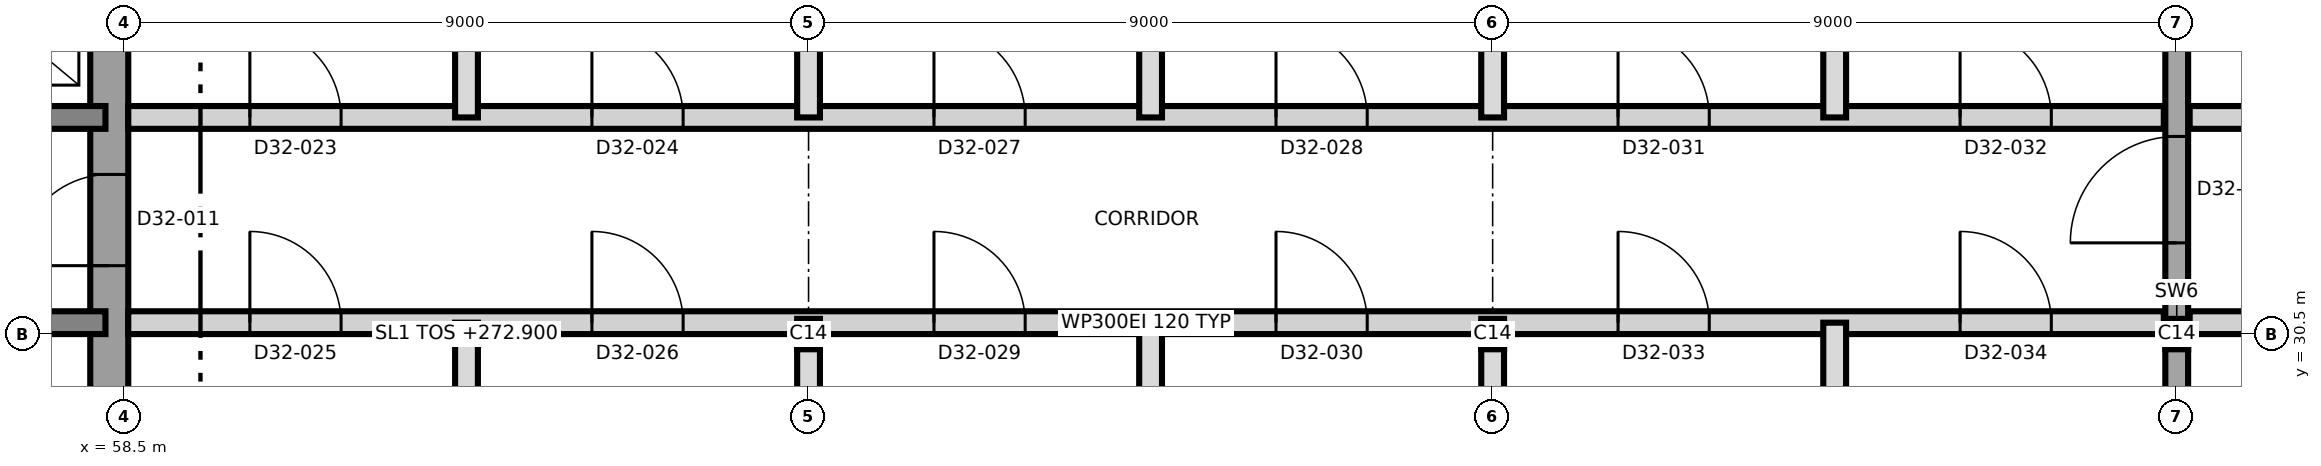
"""IFC4 building model, lengths in metres.
Left out: names, types, materials, properties, quantities, classifications, styles, units other than length and angle.
Written with IfcOpenShell. Run it as: python <this file> out.ifc"""

import sys

from ifc_helpers import new_model, si_unit, direction, frame, frame_2d, origin, origin_2d, place, context, subcontext, project, spatial, rectangle, i_section, extrude, element, fill, save


model = new_model("IFC4")
c1 = context("Model", 3, precision=1e-05, world=origin(), true_north=direction((0.0, 1.0)))
c2 = subcontext(c1, "Body", "Model", "MODEL_VIEW")
j1 = project(units=[si_unit("LENGTHUNIT", "METRE"), si_unit("PLANEANGLEUNIT", "RADIAN")], contexts=[c1])
p1 = place(None, origin())
s1 = spatial("IfcSite", under=j1, at=p1, CompositionType="ELEMENT")
p2 = place(p1, origin())
s2 = spatial("IfcBuilding", under=s1, at=p2, CompositionType="ELEMENT")
p3 = place(p2, frame((0.0, 0.0, 272.9)))
s3 = spatial("IfcBuildingStorey", under=s2, at=p3, CompositionType="ELEMENT", Elevation=272.9)
p4 = place(p3, frame((58.3, 21.25, 0.0), z_axis=(0.0, 0.0, 1.0), x_axis=(0.0, 1.0, 0.0)))
e1 = element("IfcWall", 1, at=p4, inside=s3, PredefinedType="SHEAR", context=c2, shape_type="SweptSolid", body=[
    extrude(rectangle(XDim=18.5, YDim=0.5, at=frame_2d((9.25, 0.0))), origin(), (0.0, 0.0, 1.0), 4.2),
])
p5 = place(p4, frame((10.15, 0.0, 0.0)))
e2 = element("IfcOpeningElement", 2, at=p5, cuts=e1, PredefinedType="OPENING", context=c2, shape_type="SweptSolid", body=[
    extrude(rectangle(XDim=1.2, YDim=2.1, at=frame_2d((0.6, 1.05))), frame((0.0, 0.26, 0.0), z_axis=(0.0, -1.0, 0.0), x_axis=(1.0, 0.0, 0.0)), (0.0, 0.0, 1.0), 0.52),
])
p6 = place(p3, frame((31.75, 30.65, 0.0), z_axis=(0.0, 0.0, 1.0), x_axis=(1.0, 0.0, 0.0)))
e3 = element("IfcWall", 3, at=p6, inside=s3, PredefinedType="SHEAR", context=c2, shape_type="SweptSolid", body=[
    extrude(rectangle(XDim=26.5, YDim=0.3, at=frame_2d((13.25, 0.0))), origin(), (0.0, 0.0, 1.0), 4.2),
])
p7 = place(p6, frame((24.75, 0.0, 0.0)))
e4 = element("IfcOpeningElement", 4, at=p7, cuts=e3, PredefinedType="OPENING", context=c2, shape_type="SweptSolid", body=[
    extrude(rectangle(XDim=1.0, YDim=2.1, at=frame_2d((0.5, 1.05))), frame((0.0, 0.16, 0.0), z_axis=(0.0, -1.0, 0.0), x_axis=(1.0, 0.0, 0.0)), (0.0, 0.0, 1.0), 0.32),
])
p8 = place(p6, frame((11.55, 0.0, 0.0)))
e5 = element("IfcOpeningElement", 5, at=p8, cuts=e3, PredefinedType="OPENING", context=c2, shape_type="SweptSolid", body=[
    extrude(rectangle(XDim=1.0, YDim=2.1, at=frame_2d((0.5, 1.05))), frame((0.0, 0.16, 0.0), z_axis=(0.0, -1.0, 0.0), x_axis=(1.0, 0.0, 0.0)), (0.0, 0.0, 1.0), 0.32),
])
p9 = place(p3, frame((31.75, 33.35, 0.0), z_axis=(0.0, 0.0, 1.0), x_axis=(1.0, 0.0, 0.0)))
e6 = element("IfcWall", 6, at=p9, inside=s3, PredefinedType="SHEAR", context=c2, shape_type="SweptSolid", body=[
    extrude(rectangle(XDim=26.5, YDim=0.3, at=frame_2d((13.25, 0.0))), origin(), (0.0, 0.0, 1.0), 4.2),
])
p10 = place(p9, frame((13.9, 0.0, 0.0)))
e7 = element("IfcOpeningElement", 7, at=p10, cuts=e6, PredefinedType="OPENING", context=c2, shape_type="SweptSolid", body=[
    extrude(rectangle(XDim=1.4, YDim=2.1, at=frame_2d((0.7, 1.05))), frame((0.0, 0.16, 0.0), z_axis=(0.0, -1.0, 0.0), x_axis=(1.0, 0.0, 0.0)), (0.0, 0.0, 1.0), 0.32),
])
p11 = place(p9, frame((5.375, 0.0, 0.0)))
e8 = element("IfcOpeningElement", 8, at=p11, cuts=e6, PredefinedType="OPENING", context=c2, shape_type="SweptSolid", body=[
    extrude(rectangle(XDim=1.2, YDim=2.1, at=frame_2d((0.6, 1.05))), frame((0.0, 0.16, 0.0), z_axis=(0.0, -1.0, 0.0), x_axis=(1.0, 0.0, 0.0)), (0.0, 0.0, 1.0), 0.32),
])
p12 = place(p9, frame((19.925, 0.0, 0.0)))
e9 = element("IfcOpeningElement", 9, at=p12, cuts=e6, PredefinedType="OPENING", context=c2, shape_type="SweptSolid", body=[
    extrude(rectangle(XDim=1.2, YDim=2.1, at=frame_2d((0.6, 1.05))), frame((0.0, 0.16, 0.0), z_axis=(0.0, -1.0, 0.0), x_axis=(1.0, 0.0, 0.0)), (0.0, 0.0, 1.0), 0.32),
])
p13 = place(p9, frame((9.8, 0.0, 0.0)))
e10 = element("IfcOpeningElement", 10, at=p13, cuts=e6, PredefinedType="OPENING", context=c2, shape_type="SweptSolid", body=[
    extrude(rectangle(XDim=0.9, YDim=2.1, at=frame_2d((0.45, 1.05))), frame((0.0, 0.16, 0.0), z_axis=(0.0, -1.0, 0.0), x_axis=(1.0, 0.0, 0.0)), (0.0, 0.0, 1.0), 0.32),
])
p14 = place(p3, frame((85.5, 20.35, 0.0), z_axis=(0.0, 0.0, 1.0), x_axis=(0.0, 1.0, 0.0)))
e11 = element("IfcWall", 11, at=p14, inside=s3, PredefinedType="SHEAR", context=c2, shape_type="SweptSolid", body=[
    extrude(rectangle(XDim=20.3, YDim=0.3, at=frame_2d((10.15, 0.0))), origin(), (0.0, 0.0, 1.0), 4.2),
])
p15 = place(p14, frame((11.35, 0.0, 0.0)))
e12 = element("IfcOpeningElement", 12, at=p15, cuts=e11, PredefinedType="OPENING", context=c2, shape_type="SweptSolid", body=[
    extrude(rectangle(XDim=1.4, YDim=2.1, at=frame_2d((0.7, 1.05))), frame((0.0, 0.16, 0.0), z_axis=(0.0, -1.0, 0.0), x_axis=(1.0, 0.0, 0.0)), (0.0, 0.0, 1.0), 0.32),
])
for number, where, z_axis, x_axis in (
    (13, (67.5, 30.5, 0.0), (0.0, 0.0, 1.0), (1.0, 0.0, 0.0)),
    (14, (76.5, 30.5, 0.0), (0.0, 0.0, 1.0), (1.0, 0.0, 0.0)),
    (15, (85.5, 30.5, 0.0), (0.0, 0.0, 1.0), (1.0, 0.0, 0.0)),
):
    element("IfcColumn", number, at=place(p3, frame(where, z_axis=z_axis, x_axis=x_axis)), inside=s3, PredefinedType="COLUMN", context=c2, shape_type="SweptSolid", body=[
        extrude(i_section(OverallWidth=0.3, OverallDepth=0.4, WebThickness=0.013, FlangeThickness=0.024, FilletRadius=0.027, at=origin_2d()), origin(), (0.0, 0.0, 1.0), 4.2),
    ])
p16 = place(p3, frame((58.55, 30.65, 0.0), z_axis=(0.0, 0.0, 1.0), x_axis=(1.0, 0.0, 0.0)))
e16 = element("IfcWall", 16, at=p16, inside=s3, PredefinedType="PARTITIONING", context=c2, shape_type="SweptSolid", body=[
    extrude(rectangle(XDim=26.78, YDim=0.3, at=frame_2d((13.39, 0.0))), origin(), (0.0, 0.0, 1.0), 3.9),
])
p17 = place(p16, frame((1.6, 0.0, 0.0)))
e17 = element("IfcOpeningElement", 17, at=p17, cuts=e16, PredefinedType="OPENING", context=c2, shape_type="SweptSolid", body=[
    extrude(rectangle(XDim=1.2, YDim=2.1, at=frame_2d((0.6, 1.05))), frame((0.0, 0.16, 0.0), z_axis=(0.0, -1.0, 0.0), x_axis=(1.0, 0.0, 0.0)), (0.0, 0.0, 1.0), 0.32),
])
p18 = place(p16, frame((6.1, 0.0, 0.0)))
e18 = element("IfcOpeningElement", 18, at=p18, cuts=e16, PredefinedType="OPENING", context=c2, shape_type="SweptSolid", body=[
    extrude(rectangle(XDim=1.2, YDim=2.1, at=frame_2d((0.6, 1.05))), frame((0.0, 0.16, 0.0), z_axis=(0.0, -1.0, 0.0), x_axis=(1.0, 0.0, 0.0)), (0.0, 0.0, 1.0), 0.32),
])
p19 = place(p16, frame((10.6, 0.0, 0.0)))
e19 = element("IfcOpeningElement", 19, at=p19, cuts=e16, PredefinedType="OPENING", context=c2, shape_type="SweptSolid", body=[
    extrude(rectangle(XDim=1.2, YDim=2.1, at=frame_2d((0.6, 1.05))), frame((0.0, 0.16, 0.0), z_axis=(0.0, -1.0, 0.0), x_axis=(1.0, 0.0, 0.0)), (0.0, 0.0, 1.0), 0.32),
])
p20 = place(p16, frame((15.1, 0.0, 0.0)))
e20 = element("IfcOpeningElement", 20, at=p20, cuts=e16, PredefinedType="OPENING", context=c2, shape_type="SweptSolid", body=[
    extrude(rectangle(XDim=1.2, YDim=2.1, at=frame_2d((0.6, 1.05))), frame((0.0, 0.16, 0.0), z_axis=(0.0, -1.0, 0.0), x_axis=(1.0, 0.0, 0.0)), (0.0, 0.0, 1.0), 0.32),
])
p21 = place(p16, frame((19.6, 0.0, 0.0)))
e21 = element("IfcOpeningElement", 21, at=p21, cuts=e16, PredefinedType="OPENING", context=c2, shape_type="SweptSolid", body=[
    extrude(rectangle(XDim=1.2, YDim=2.1, at=frame_2d((0.6, 1.05))), frame((0.0, 0.16, 0.0), z_axis=(0.0, -1.0, 0.0), x_axis=(1.0, 0.0, 0.0)), (0.0, 0.0, 1.0), 0.32),
])
p22 = place(p16, frame((24.1, 0.0, 0.0)))
e22 = element("IfcOpeningElement", 22, at=p22, cuts=e16, PredefinedType="OPENING", context=c2, shape_type="SweptSolid", body=[
    extrude(rectangle(XDim=1.2, YDim=2.1, at=frame_2d((0.6, 1.05))), frame((0.0, 0.16, 0.0), z_axis=(0.0, -1.0, 0.0), x_axis=(1.0, 0.0, 0.0)), (0.0, 0.0, 1.0), 0.32),
])
p23 = place(p3, frame((85.67, 30.65, 0.0), z_axis=(0.0, 0.0, 1.0), x_axis=(1.0, 0.0, 0.0)))
e23 = element("IfcWall", 23, at=p23, inside=s3, PredefinedType="PARTITIONING", context=c2, shape_type="SweptSolid", body=[
    extrude(rectangle(XDim=9.58, YDim=0.3, at=frame_2d((4.79, 0.0))), origin(), (0.0, 0.0, 1.0), 3.9),
])
p24 = place(p23, frame((2.23, 0.0, 0.0)))
e24 = element("IfcOpeningElement", 24, at=p24, cuts=e23, PredefinedType="OPENING", context=c2, shape_type="SweptSolid", body=[
    extrude(rectangle(XDim=0.9, YDim=2.1, at=frame_2d((0.45, 1.05))), frame((0.0, 0.16, 0.0), z_axis=(0.0, -1.0, 0.0), x_axis=(1.0, 0.0, 0.0)), (0.0, 0.0, 1.0), 0.32),
])
p25 = place(p23, frame((5.63, 0.0, 0.0)))
e25 = element("IfcOpeningElement", 25, at=p25, cuts=e23, PredefinedType="OPENING", context=c2, shape_type="SweptSolid", body=[
    extrude(rectangle(XDim=1.0, YDim=2.1, at=frame_2d((0.5, 1.05))), frame((0.0, 0.16, 0.0), z_axis=(0.0, -1.0, 0.0), x_axis=(1.0, 0.0, 0.0)), (0.0, 0.0, 1.0), 0.32),
])
p26 = place(p3, frame((58.55, 33.35, 0.0), z_axis=(0.0, 0.0, 1.0), x_axis=(1.0, 0.0, 0.0)))
e26 = element("IfcWall", 26, at=p26, inside=s3, PredefinedType="PARTITIONING", context=c2, shape_type="SweptSolid", body=[
    extrude(rectangle(XDim=26.78, YDim=0.3, at=frame_2d((13.39, 0.0))), origin(), (0.0, 0.0, 1.0), 3.9),
])
p27 = place(p26, frame((1.6, 0.0, 0.0)))
e27 = element("IfcOpeningElement", 27, at=p27, cuts=e26, PredefinedType="OPENING", context=c2, shape_type="SweptSolid", body=[
    extrude(rectangle(XDim=1.2, YDim=2.1, at=frame_2d((0.6, 1.05))), frame((0.0, 0.16, 0.0), z_axis=(0.0, -1.0, 0.0), x_axis=(1.0, 0.0, 0.0)), (0.0, 0.0, 1.0), 0.32),
])
p28 = place(p26, frame((6.1, 0.0, 0.0)))
e28 = element("IfcOpeningElement", 28, at=p28, cuts=e26, PredefinedType="OPENING", context=c2, shape_type="SweptSolid", body=[
    extrude(rectangle(XDim=1.2, YDim=2.1, at=frame_2d((0.6, 1.05))), frame((0.0, 0.16, 0.0), z_axis=(0.0, -1.0, 0.0), x_axis=(1.0, 0.0, 0.0)), (0.0, 0.0, 1.0), 0.32),
])
p29 = place(p26, frame((10.6, 0.0, 0.0)))
e29 = element("IfcOpeningElement", 29, at=p29, cuts=e26, PredefinedType="OPENING", context=c2, shape_type="SweptSolid", body=[
    extrude(rectangle(XDim=1.2, YDim=2.1, at=frame_2d((0.6, 1.05))), frame((0.0, 0.16, 0.0), z_axis=(0.0, -1.0, 0.0), x_axis=(1.0, 0.0, 0.0)), (0.0, 0.0, 1.0), 0.32),
])
p30 = place(p26, frame((15.1, 0.0, 0.0)))
e30 = element("IfcOpeningElement", 30, at=p30, cuts=e26, PredefinedType="OPENING", context=c2, shape_type="SweptSolid", body=[
    extrude(rectangle(XDim=1.2, YDim=2.1, at=frame_2d((0.6, 1.05))), frame((0.0, 0.16, 0.0), z_axis=(0.0, -1.0, 0.0), x_axis=(1.0, 0.0, 0.0)), (0.0, 0.0, 1.0), 0.32),
])
p31 = place(p26, frame((19.6, 0.0, 0.0)))
e31 = element("IfcOpeningElement", 31, at=p31, cuts=e26, PredefinedType="OPENING", context=c2, shape_type="SweptSolid", body=[
    extrude(rectangle(XDim=1.2, YDim=2.1, at=frame_2d((0.6, 1.05))), frame((0.0, 0.16, 0.0), z_axis=(0.0, -1.0, 0.0), x_axis=(1.0, 0.0, 0.0)), (0.0, 0.0, 1.0), 0.32),
])
p32 = place(p26, frame((24.1, 0.0, 0.0)))
e32 = element("IfcOpeningElement", 32, at=p32, cuts=e26, PredefinedType="OPENING", context=c2, shape_type="SweptSolid", body=[
    extrude(rectangle(XDim=1.2, YDim=2.1, at=frame_2d((0.6, 1.05))), frame((0.0, 0.16, 0.0), z_axis=(0.0, -1.0, 0.0), x_axis=(1.0, 0.0, 0.0)), (0.0, 0.0, 1.0), 0.32),
])
p33 = place(p3, frame((85.67, 33.35, 0.0), z_axis=(0.0, 0.0, 1.0), x_axis=(1.0, 0.0, 0.0)))
e33 = element("IfcWall", 33, at=p33, inside=s3, PredefinedType="PARTITIONING", context=c2, shape_type="SweptSolid", body=[
    extrude(rectangle(XDim=9.58, YDim=0.3, at=frame_2d((4.79, 0.0))), origin(), (0.0, 0.0, 1.0), 3.9),
])
p34 = place(p33, frame((1.83, 0.0, 0.0)))
e34 = element("IfcOpeningElement", 34, at=p34, cuts=e33, PredefinedType="OPENING", context=c2, shape_type="SweptSolid", body=[
    extrude(rectangle(XDim=1.0, YDim=2.1, at=frame_2d((0.5, 1.05))), frame((0.0, 0.16, 0.0), z_axis=(0.0, -1.0, 0.0), x_axis=(1.0, 0.0, 0.0)), (0.0, 0.0, 1.0), 0.32),
])
p35 = place(p33, frame((5.63, 0.0, 0.0)))
e35 = element("IfcOpeningElement", 35, at=p35, cuts=e33, PredefinedType="OPENING", context=c2, shape_type="SweptSolid", body=[
    extrude(rectangle(XDim=1.0, YDim=2.1, at=frame_2d((0.5, 1.05))), frame((0.0, 0.16, 0.0), z_axis=(0.0, -1.0, 0.0), x_axis=(1.0, 0.0, 0.0)), (0.0, 0.0, 1.0), 0.32),
])
p36 = place(p3, frame((63.0, 20.17, 0.0), z_axis=(0.0, 0.0, 1.0), x_axis=(0.0, 1.0, 0.0)))
e36 = element("IfcWall", 36, at=p36, inside=s3, PredefinedType="PARTITIONING", context=c2, shape_type="SweptSolid", body=[
    extrude(rectangle(XDim=10.48, YDim=0.3, at=frame_2d((5.24, 0.0))), origin(), (0.0, 0.0, 1.0), 3.9),
])
p37 = place(p3, frame((63.0, 33.35, 0.0), z_axis=(0.0, 0.0, 1.0), x_axis=(0.0, 1.0, 0.0)))
e37 = element("IfcWall", 37, at=p37, inside=s3, PredefinedType="PARTITIONING", context=c2, shape_type="SweptSolid", body=[
    extrude(rectangle(XDim=7.48, YDim=0.3, at=frame_2d((3.74, 0.0))), origin(), (0.0, 0.0, 1.0), 3.9),
])
p38 = place(p3, frame((67.5, 20.17, 0.0), z_axis=(0.0, 0.0, 1.0), x_axis=(0.0, 1.0, 0.0)))
e38 = element("IfcWall", 38, at=p38, inside=s3, PredefinedType="PARTITIONING", context=c2, shape_type="SweptSolid", body=[
    extrude(rectangle(XDim=10.48, YDim=0.3, at=frame_2d((5.24, 0.0))), origin(), (0.0, 0.0, 1.0), 3.9),
])
p39 = place(p3, frame((67.5, 33.35, 0.0), z_axis=(0.0, 0.0, 1.0), x_axis=(0.0, 1.0, 0.0)))
e39 = element("IfcWall", 39, at=p39, inside=s3, PredefinedType="PARTITIONING", context=c2, shape_type="SweptSolid", body=[
    extrude(rectangle(XDim=7.48, YDim=0.3, at=frame_2d((3.74, 0.0))), origin(), (0.0, 0.0, 1.0), 3.9),
])
p40 = place(p3, frame((72.0, 20.17, 0.0), z_axis=(0.0, 0.0, 1.0), x_axis=(0.0, 1.0, 0.0)))
e40 = element("IfcWall", 40, at=p40, inside=s3, PredefinedType="PARTITIONING", context=c2, shape_type="SweptSolid", body=[
    extrude(rectangle(XDim=10.48, YDim=0.3, at=frame_2d((5.24, 0.0))), origin(), (0.0, 0.0, 1.0), 3.9),
])
p41 = place(p3, frame((72.0, 33.35, 0.0), z_axis=(0.0, 0.0, 1.0), x_axis=(0.0, 1.0, 0.0)))
e41 = element("IfcWall", 41, at=p41, inside=s3, PredefinedType="PARTITIONING", context=c2, shape_type="SweptSolid", body=[
    extrude(rectangle(XDim=7.48, YDim=0.3, at=frame_2d((3.74, 0.0))), origin(), (0.0, 0.0, 1.0), 3.9),
])
p42 = place(p3, frame((76.5, 20.17, 0.0), z_axis=(0.0, 0.0, 1.0), x_axis=(0.0, 1.0, 0.0)))
e42 = element("IfcWall", 42, at=p42, inside=s3, PredefinedType="PARTITIONING", context=c2, shape_type="SweptSolid", body=[
    extrude(rectangle(XDim=10.48, YDim=0.3, at=frame_2d((5.24, 0.0))), origin(), (0.0, 0.0, 1.0), 3.9),
])
p43 = place(p3, frame((76.5, 33.35, 0.0), z_axis=(0.0, 0.0, 1.0), x_axis=(0.0, 1.0, 0.0)))
e43 = element("IfcWall", 43, at=p43, inside=s3, PredefinedType="PARTITIONING", context=c2, shape_type="SweptSolid", body=[
    extrude(rectangle(XDim=7.48, YDim=0.3, at=frame_2d((3.74, 0.0))), origin(), (0.0, 0.0, 1.0), 3.9),
])
p44 = place(p3, frame((81.0, 20.17, 0.0), z_axis=(0.0, 0.0, 1.0), x_axis=(0.0, 1.0, 0.0)))
e44 = element("IfcWall", 44, at=p44, inside=s3, PredefinedType="PARTITIONING", context=c2, shape_type="SweptSolid", body=[
    extrude(rectangle(XDim=10.48, YDim=0.3, at=frame_2d((5.24, 0.0))), origin(), (0.0, 0.0, 1.0), 3.9),
])
p45 = place(p3, frame((81.0, 33.35, 0.0), z_axis=(0.0, 0.0, 1.0), x_axis=(0.0, 1.0, 0.0)))
e45 = element("IfcWall", 45, at=p45, inside=s3, PredefinedType="PARTITIONING", context=c2, shape_type="SweptSolid", body=[
    extrude(rectangle(XDim=7.48, YDim=0.3, at=frame_2d((3.74, 0.0))), origin(), (0.0, 0.0, 1.0), 3.9),
])
p46 = place(p5, origin())
e46 = element("IfcDoor", 46, at=p46, inside=s3, OperationType="SINGLE_SWING_LEFT", PredefinedType="DOOR", context=c2, shape_type="SweptSolid", body=[
    extrude(rectangle(XDim=1.2, YDim=2.1, at=frame_2d((0.6, 1.05))), frame((0.0, 0.025, 0.0), z_axis=(0.0, -1.0, 0.0), x_axis=(1.0, 0.0, 0.0)), (0.0, 0.0, 1.0), 0.05),
])
fill(e2, e46)
p47 = place(p27, origin())
e47 = element("IfcDoor", 47, at=p47, inside=s3, OperationType="SINGLE_SWING_LEFT", PredefinedType="DOOR", context=c2, shape_type="SweptSolid", body=[
    extrude(rectangle(XDim=1.2, YDim=2.1, at=frame_2d((0.6, 1.05))), frame((0.0, 0.025, 0.0), z_axis=(0.0, -1.0, 0.0), x_axis=(1.0, 0.0, 0.0)), (0.0, 0.0, 1.0), 0.05),
])
fill(e27, e47)
p48 = place(p28, origin())
e48 = element("IfcDoor", 48, at=p48, inside=s3, OperationType="SINGLE_SWING_LEFT", PredefinedType="DOOR", context=c2, shape_type="SweptSolid", body=[
    extrude(rectangle(XDim=1.2, YDim=2.1, at=frame_2d((0.6, 1.05))), frame((0.0, 0.025, 0.0), z_axis=(0.0, -1.0, 0.0), x_axis=(1.0, 0.0, 0.0)), (0.0, 0.0, 1.0), 0.05),
])
fill(e28, e48)
p49 = place(p17, origin())
e49 = element("IfcDoor", 49, at=p49, inside=s3, OperationType="SINGLE_SWING_RIGHT", PredefinedType="DOOR", context=c2, shape_type="SweptSolid", body=[
    extrude(rectangle(XDim=1.2, YDim=2.1, at=frame_2d((0.6, 1.05))), frame((0.0, 0.025, 0.0), z_axis=(0.0, -1.0, 0.0), x_axis=(1.0, 0.0, 0.0)), (0.0, 0.0, 1.0), 0.05),
])
fill(e17, e49)
p50 = place(p18, origin())
e50 = element("IfcDoor", 50, at=p50, inside=s3, OperationType="SINGLE_SWING_LEFT", PredefinedType="DOOR", context=c2, shape_type="SweptSolid", body=[
    extrude(rectangle(XDim=1.2, YDim=2.1, at=frame_2d((0.6, 1.05))), frame((0.0, 0.025, 0.0), z_axis=(0.0, -1.0, 0.0), x_axis=(1.0, 0.0, 0.0)), (0.0, 0.0, 1.0), 0.05),
])
fill(e18, e50)
p51 = place(p29, origin())
e51 = element("IfcDoor", 51, at=p51, inside=s3, OperationType="SINGLE_SWING_LEFT", PredefinedType="DOOR", context=c2, shape_type="SweptSolid", body=[
    extrude(rectangle(XDim=1.2, YDim=2.1, at=frame_2d((0.6, 1.05))), frame((0.0, 0.025, 0.0), z_axis=(0.0, -1.0, 0.0), x_axis=(1.0, 0.0, 0.0)), (0.0, 0.0, 1.0), 0.05),
])
fill(e29, e51)
p52 = place(p30, origin())
e52 = element("IfcDoor", 52, at=p52, inside=s3, OperationType="SINGLE_SWING_RIGHT", PredefinedType="DOOR", context=c2, shape_type="SweptSolid", body=[
    extrude(rectangle(XDim=1.2, YDim=2.1, at=frame_2d((0.6, 1.05))), frame((0.0, 0.025, 0.0), z_axis=(0.0, -1.0, 0.0), x_axis=(1.0, 0.0, 0.0)), (0.0, 0.0, 1.0), 0.05),
])
fill(e30, e52)
p53 = place(p19, origin())
e53 = element("IfcDoor", 53, at=p53, inside=s3, OperationType="SINGLE_SWING_LEFT", PredefinedType="DOOR", context=c2, shape_type="SweptSolid", body=[
    extrude(rectangle(XDim=1.2, YDim=2.1, at=frame_2d((0.6, 1.05))), frame((0.0, 0.025, 0.0), z_axis=(0.0, -1.0, 0.0), x_axis=(1.0, 0.0, 0.0)), (0.0, 0.0, 1.0), 0.05),
])
fill(e19, e53)
p54 = place(p20, origin())
e54 = element("IfcDoor", 54, at=p54, inside=s3, OperationType="SINGLE_SWING_LEFT", PredefinedType="DOOR", context=c2, shape_type="SweptSolid", body=[
    extrude(rectangle(XDim=1.2, YDim=2.1, at=frame_2d((0.6, 1.05))), frame((0.0, 0.025, 0.0), z_axis=(0.0, -1.0, 0.0), x_axis=(1.0, 0.0, 0.0)), (0.0, 0.0, 1.0), 0.05),
])
fill(e20, e54)
p55 = place(p31, origin())
e55 = element("IfcDoor", 55, at=p55, inside=s3, OperationType="SINGLE_SWING_RIGHT", PredefinedType="DOOR", context=c2, shape_type="SweptSolid", body=[
    extrude(rectangle(XDim=1.2, YDim=2.1, at=frame_2d((0.6, 1.05))), frame((0.0, 0.025, 0.0), z_axis=(0.0, -1.0, 0.0), x_axis=(1.0, 0.0, 0.0)), (0.0, 0.0, 1.0), 0.05),
])
fill(e31, e55)
p56 = place(p32, origin())
e56 = element("IfcDoor", 56, at=p56, inside=s3, OperationType="SINGLE_SWING_LEFT", PredefinedType="DOOR", context=c2, shape_type="SweptSolid", body=[
    extrude(rectangle(XDim=1.2, YDim=2.1, at=frame_2d((0.6, 1.05))), frame((0.0, 0.025, 0.0), z_axis=(0.0, -1.0, 0.0), x_axis=(1.0, 0.0, 0.0)), (0.0, 0.0, 1.0), 0.05),
])
fill(e32, e56)
p57 = place(p21, origin())
e57 = element("IfcDoor", 57, at=p57, inside=s3, OperationType="SINGLE_SWING_LEFT", PredefinedType="DOOR", context=c2, shape_type="SweptSolid", body=[
    extrude(rectangle(XDim=1.2, YDim=2.1, at=frame_2d((0.6, 1.05))), frame((0.0, 0.025, 0.0), z_axis=(0.0, -1.0, 0.0), x_axis=(1.0, 0.0, 0.0)), (0.0, 0.0, 1.0), 0.05),
])
fill(e21, e57)
p58 = place(p22, origin())
e58 = element("IfcDoor", 58, at=p58, inside=s3, OperationType="SINGLE_SWING_RIGHT", PredefinedType="DOOR", context=c2, shape_type="SweptSolid", body=[
    extrude(rectangle(XDim=1.2, YDim=2.1, at=frame_2d((0.6, 1.05))), frame((0.0, 0.025, 0.0), z_axis=(0.0, -1.0, 0.0), x_axis=(1.0, 0.0, 0.0)), (0.0, 0.0, 1.0), 0.05),
])
fill(e22, e58)
p59 = place(p15, origin())
e59 = element("IfcDoor", 59, at=p59, inside=s3, OperationType="SINGLE_SWING_RIGHT", PredefinedType="DOOR", context=c2, shape_type="SweptSolid", body=[
    extrude(rectangle(XDim=1.4, YDim=2.1, at=frame_2d((0.7, 1.05))), frame((0.0, 0.025, 0.0), z_axis=(0.0, -1.0, 0.0), x_axis=(1.0, 0.0, 0.0)), (0.0, 0.0, 1.0), 0.05),
])
fill(e12, e59)
save(model, sys.argv[1])
